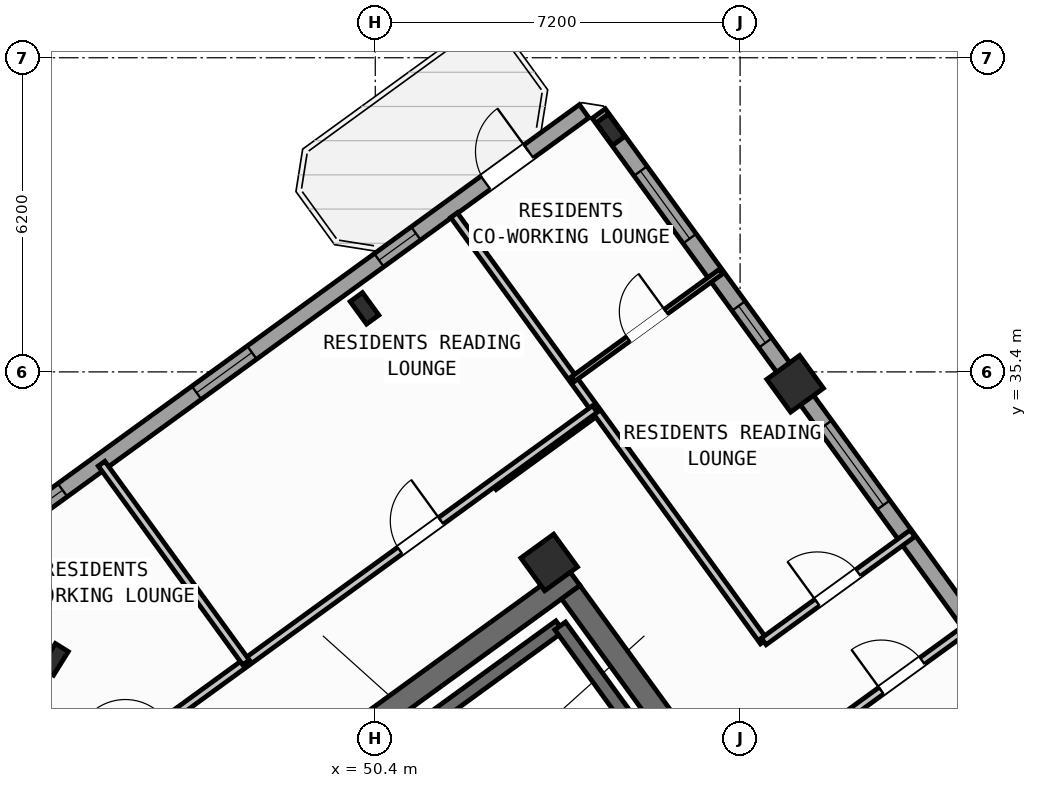
"""IFC4 building model, lengths in metres.
Left out: names, types, materials, properties, quantities, classifications, styles, units other than length and angle.
Written with IfcOpenShell. Run it as: python <this file> out.ifc"""

import sys

from ifc_helpers import new_model, si_unit, direction, frame, frame_2d, origin, origin_2d, place, context, subcontext, project, spatial, rectangle, hollow_rectangle, i_section, extrude, source, transform, mapped, element, fill, save


model = new_model("IFC4")
c1 = context("Model", 3, precision=1e-05, world=origin(), true_north=direction((0.0, 1.0)))
c2 = subcontext(c1, "Body", "Model", "MODEL_VIEW")
j1 = project(units=[si_unit("LENGTHUNIT", "METRE"), si_unit("PLANEANGLEUNIT", "RADIAN")], contexts=[c1])
p1 = place(None, origin())
s1 = spatial("IfcSite", under=j1, at=p1, CompositionType="ELEMENT")
p2 = place(p1, origin())
s2 = spatial("IfcBuilding", under=s1, at=p2, CompositionType="ELEMENT")
p3 = place(p2, frame((0.0, 0.0, 214.8)))
s3 = spatial("IfcBuildingStorey", under=s2, at=p3, CompositionType="ELEMENT", Elevation=214.8)
p4 = place(p3, frame((44.406, 24.172, 0.0), z_axis=(0.0, 0.0, 1.0), x_axis=(0.809012867805, 0.587790931986, 0.0)))
e1 = element("IfcWall", 1, at=p4, inside=s3, PredefinedType="SHEAR", context=c2, shape_type="SweptSolid", body=[
    extrude(rectangle(XDim=12.24, YDim=0.45, at=frame_2d((6.12, 0.0))), origin(), (0.0, 0.0, 1.0), 3.35),
])
p5 = place(p3, frame((58.064, 25.813, 0.0), z_axis=(0.0, 0.0, 1.0), x_axis=(-0.587774812919, 0.809024578921, 0.0)))
e2 = element("IfcWall", 2, at=p5, inside=s3, PredefinedType="SHEAR", context=c2, shape_type="SweptSolid", body=[
    extrude(rectangle(XDim=6.475, YDim=0.45, at=frame_2d((3.238, 0.0))), origin(), (0.0, 0.0, 1.0), 3.35),
])
m1 = source(origin(), c2, "Body", "SweptSolid", [
    extrude(i_section(OverallWidth=0.3, OverallDepth=0.55, WebThickness=0.015, FlangeThickness=0.029, at=origin_2d()), origin(), (0.0, 0.0, 1.0), 3.6),
])
p6 = place(p3, frame((44.068, 29.726, 0.0), z_axis=(0.0, 0.0, 1.0), x_axis=(-0.848048096156, 0.529919264233, 0.0)))
e3 = element("IfcColumn", 3, at=p6, inside=s3, PredefinedType="COLUMN", context=c2, shape_type="MappedRepresentation", body=[
    mapped(m1, transform((0.0, 0.0, 0.0), scale=1.0)),
])
m2 = source(origin(), c2, "Body", "SweptSolid", [
    extrude(hollow_rectangle(XDim=0.8, YDim=0.8, WallThickness=0.032, at=origin_2d()), origin(), (0.0, 0.0, 1.0), 3.6),
])
p7 = place(p3, frame((53.832, 31.638, 0.0), z_axis=(0.0, 0.0, 1.0), x_axis=(0.809016994375, 0.587785252292, 0.0)))
e4 = element("IfcColumn", 4, at=p7, inside=s3, PredefinedType="COLUMN", context=c2, shape_type="MappedRepresentation", body=[
    mapped(m2, transform((0.0, 0.0, 0.0), scale=1.0)),
])
p8 = place(p3, frame((50.188, 36.654, 0.0), z_axis=(0.0, 0.0, 1.0), x_axis=(0.809016994375, 0.587785252292, 0.0)))
e5 = element("IfcColumn", 5, at=p8, inside=s3, PredefinedType="COLUMN", context=c2, shape_type="MappedRepresentation", body=[
    mapped(m1, transform((0.0, 0.0, 0.0), scale=1.0)),
])
p9 = place(p3, frame((58.686, 35.165, 0.0), z_axis=(0.0, 0.0, 1.0), x_axis=(0.809016994375, 0.587785252292, 0.0)))
e6 = element("IfcColumn", 6, at=p9, inside=s3, PredefinedType="COLUMN", context=c2, shape_type="MappedRepresentation", body=[
    mapped(m2, transform((0.0, 0.0, 0.0), scale=1.0)),
])
p10 = place(p3, frame((55.042, 40.181, 0.0), z_axis=(0.0, 0.0, 1.0), x_axis=(0.809016994375, 0.587785252292, 0.0)))
e7 = element("IfcColumn", 7, at=p10, inside=s3, PredefinedType="COLUMN", context=c2, shape_type="MappedRepresentation", body=[
    mapped(m1, transform((0.0, 0.0, 0.0), scale=1.0)),
])
p11 = place(p3, frame((42.207, 31.597, 0.0), z_axis=(0.0, 0.0, 1.0), x_axis=(0.809020333377, 0.587780656523, 0.0)))
e8 = element("IfcWall", 8, at=p11, inside=s3, PredefinedType="STANDARD", context=c2, shape_type="SweptSolid", body=[
    extrude(rectangle(XDim=15.223, YDim=0.32, at=frame_2d((7.611, 0.0))), origin(), (0.0, 0.0, 1.0), 3.35),
])
p12 = place(p11, frame((12.82, 0.0, 0.0)))
e9 = element("IfcOpeningElement", 9, at=p12, cuts=e8, PredefinedType="OPENING", context=c2, shape_type="SweptSolid", body=[
    extrude(rectangle(XDim=1.05, YDim=2.15, at=frame_2d((0.525, 1.075))), frame((0.0, 0.17, 0.0), z_axis=(0.0, -1.0, 0.0), x_axis=(1.0, 0.0, 0.0)), (0.0, 0.0, 1.0), 0.34),
])
p13 = place(p11, frame((0.85, 0.0, 0.9)))
e10 = element("IfcOpeningElement", 10, at=p13, cuts=e8, PredefinedType="OPENING", context=c2, shape_type="SweptSolid", body=[
    extrude(rectangle(XDim=1.65, YDim=1.45, at=frame_2d((0.825, 0.725))), frame((0.0, 0.17, 0.0), z_axis=(0.0, -1.0, 0.0), x_axis=(1.0, 0.0, 0.0)), (0.0, 0.0, 1.0), 0.34),
])
p14 = place(p11, frame((5.769, 0.0, 0.9)))
e11 = element("IfcOpeningElement", 11, at=p14, cuts=e8, PredefinedType="OPENING", context=c2, shape_type="SweptSolid", body=[
    extrude(rectangle(XDim=1.35, YDim=1.45, at=frame_2d((0.675, 0.725))), frame((0.0, 0.17, 0.0), z_axis=(0.0, -1.0, 0.0), x_axis=(1.0, 0.0, 0.0)), (0.0, 0.0, 1.0), 0.34),
])
p15 = place(p11, frame((10.219, 0.0, 1.0)))
e12 = element("IfcOpeningElement", 12, at=p15, cuts=e8, PredefinedType="OPENING", context=c2, shape_type="SweptSolid", body=[
    extrude(rectangle(XDim=0.9, YDim=1.25, at=frame_2d((0.45, 0.625))), frame((0.0, 0.17, 0.0), z_axis=(0.0, -1.0, 0.0), x_axis=(1.0, 0.0, 0.0)), (0.0, 0.0, 1.0), 0.34),
])
p16 = place(p3, frame((54.81, 40.5, 0.0), z_axis=(0.0, 0.0, 1.0), x_axis=(0.587783625747, -0.809018176127, 0.0)))
e13 = element("IfcWall", 13, at=p16, inside=s3, PredefinedType="STANDARD", context=c2, shape_type="SweptSolid", body=[
    extrude(rectangle(XDim=21.587, YDim=0.32, at=frame_2d((10.794, 0.0))), origin(), (0.0, 0.0, 1.0), 2.825),
])
p17 = place(p16, frame((1.403, 0.0, 0.9)))
e14 = element("IfcOpeningElement", 14, at=p17, cuts=e13, PredefinedType="OPENING", context=c2, shape_type="SweptSolid", body=[
    extrude(rectangle(XDim=1.65, YDim=1.45, at=frame_2d((0.825, 0.725))), frame((0.0, 0.17, 0.0), z_axis=(0.0, -1.0, 0.0), x_axis=(1.0, 0.0, 0.0)), (0.0, 0.0, 1.0), 0.34),
])
p18 = place(p16, frame((4.695, 0.0, 1.0)))
e15 = element("IfcOpeningElement", 15, at=p18, cuts=e13, PredefinedType="OPENING", context=c2, shape_type="SweptSolid", body=[
    extrude(rectangle(XDim=0.9, YDim=1.25, at=frame_2d((0.45, 0.625))), frame((0.0, 0.17, 0.0), z_axis=(0.0, -1.0, 0.0), x_axis=(1.0, 0.0, 0.0)), (0.0, 0.0, 1.0), 0.34),
])
p19 = place(p16, frame((7.604, 0.0, 0.95)))
e16 = element("IfcOpeningElement", 16, at=p19, cuts=e13, PredefinedType="OPENING", context=c2, shape_type="SweptSolid", body=[
    extrude(rectangle(XDim=1.95, YDim=1.35, at=frame_2d((0.975, 0.675))), frame((0.0, 0.17, 0.0), z_axis=(0.0, -1.0, 0.0), x_axis=(1.0, 0.0, 0.0)), (0.0, 0.0, 1.0), 0.34),
])
p20 = place(p16, frame((15.692, 0.0, 1.0)))
e17 = element("IfcOpeningElement", 17, at=p20, cuts=e13, PredefinedType="OPENING", context=c2, shape_type="SweptSolid", body=[
    extrude(rectangle(XDim=0.9, YDim=1.25, at=frame_2d((0.45, 0.625))), frame((0.0, 0.17, 0.0), z_axis=(0.0, -1.0, 0.0), x_axis=(1.0, 0.0, 0.0)), (0.0, 0.0, 1.0), 0.34),
])
p21 = place(p16, frame((18.872, 0.0, 0.9)))
e18 = element("IfcOpeningElement", 18, at=p21, cuts=e13, PredefinedType="OPENING", context=c2, shape_type="SweptSolid", body=[
    extrude(rectangle(XDim=1.35, YDim=1.45, at=frame_2d((0.675, 0.725))), frame((0.0, 0.17, 0.0), z_axis=(0.0, -1.0, 0.0), x_axis=(1.0, 0.0, 0.0)), (0.0, 0.0, 1.0), 0.34),
])
p22 = place(p3, frame((48.006, 25.996, 0.0), z_axis=(0.0, 0.0, 1.0), x_axis=(0.80901903764, 0.587782439969, 0.0)))
e19 = element("IfcWall", 19, at=p22, inside=s3, PredefinedType="SHEAR", context=c2, shape_type="SweptSolid", body=[
    extrude(rectangle(XDim=7.46, YDim=0.26, at=frame_2d((3.73, 0.0))), origin(), (0.0, 0.0, 1.0), 3.35),
])
p23 = place(p3, frame((55.906, 27.831, 0.0), z_axis=(0.0, 0.0, 1.0), x_axis=(-0.587804123638, 0.809003283204, 0.0)))
e20 = element("IfcWall", 20, at=p23, inside=s3, PredefinedType="SHEAR", context=c2, shape_type="SweptSolid", body=[
    extrude(rectangle(XDim=3.16, YDim=0.26, at=frame_2d((1.58, 0.0))), origin(), (0.0, 0.0, 1.0), 3.35),
])
p24 = place(p3, frame((52.739, 33.143, 0.0), z_axis=(0.0, 0.0, 1.0), x_axis=(0.809000999347, 0.58780726693, 0.0)))
e21 = element("IfcWall", 21, at=p24, inside=s3, PredefinedType="PARTITIONING", context=c2, shape_type="SweptSolid", body=[
    extrude(rectangle(XDim=2.51, YDim=0.16, at=frame_2d((1.255, 0.0))), origin(), (0.0, 0.0, 1.0), 3.34),
])
p25 = place(p3, frame((58.067, 30.08, 0.0), z_axis=(0.0, 0.0, 1.0), x_axis=(-0.587787785243, 0.809015154073, 0.0)))
e22 = element("IfcWall", 22, at=p25, inside=s3, PredefinedType="PARTITIONING", context=c2, shape_type="SweptSolid", body=[
    extrude(rectangle(XDim=10.4, YDim=0.16, at=frame_2d((5.2, 0.0))), origin(), (0.0, 0.0, 1.0), 3.34),
])
p26 = place(p3, frame((59.331, 28.341, 0.0), z_axis=(0.0, 0.0, 1.0), x_axis=(0.809003564202, 0.587803736896, 0.0)))
e23 = element("IfcWall", 23, at=p26, inside=s3, PredefinedType="PARTITIONING", context=c2, shape_type="SweptSolid", body=[
    extrude(rectangle(XDim=3.63, YDim=0.16, at=frame_2d((1.815, 0.0))), origin(), (0.0, 0.0, 1.0), 3.34),
])
p27 = place(p26, frame((1.305, 0.0, 0.0)))
e24 = element("IfcOpeningElement", 24, at=p27, cuts=e23, PredefinedType="OPENING", context=c2, shape_type="SweptSolid", body=[
    extrude(rectangle(XDim=1.0, YDim=2.1, at=frame_2d((0.5, 1.05))), frame((0.0, 0.09, 0.0), z_axis=(0.0, -1.0, 0.0), x_axis=(1.0, 0.0, 0.0)), (0.0, 0.0, 1.0), 0.18),
])
p28 = place(p3, frame((58.067, 30.08, 0.0), z_axis=(0.0, 0.0, 1.0), x_axis=(0.809012309495, 0.587791700422, 0.0)))
e25 = element("IfcWall", 25, at=p28, inside=s3, PredefinedType="PARTITIONING", context=c2, shape_type="SweptSolid", body=[
    extrude(rectangle(XDim=3.63, YDim=0.16, at=frame_2d((1.815, 0.0))), origin(), (0.0, 0.0, 1.0), 3.34),
])
p29 = place(p28, frame((1.305, 0.0, 0.0)))
e26 = element("IfcOpeningElement", 26, at=p29, cuts=e25, PredefinedType="OPENING", context=c2, shape_type="SweptSolid", body=[
    extrude(rectangle(XDim=1.0, YDim=2.1, at=frame_2d((0.5, 1.05))), frame((0.0, 0.09, 0.0), z_axis=(0.0, -1.0, 0.0), x_axis=(1.0, 0.0, 0.0)), (0.0, 0.0, 1.0), 0.18),
])
p30 = place(p3, frame((54.304, 35.259, 0.0), z_axis=(0.0, 0.0, 1.0), x_axis=(0.809005039917, 0.58780170584, 0.0)))
e27 = element("IfcWall", 27, at=p30, inside=s3, PredefinedType="PARTITIONING", context=c2, shape_type="SweptSolid", body=[
    extrude(rectangle(XDim=3.61, YDim=0.11, at=frame_2d((1.805, 0.0))), origin(), (0.0, 0.0, 1.0), 3.34),
])
p31 = place(p30, frame((1.345, 0.0, 0.0)))
e28 = element("IfcOpeningElement", 28, at=p31, cuts=e27, PredefinedType="OPENING", context=c2, shape_type="SweptSolid", body=[
    extrude(rectangle(XDim=0.92, YDim=2.08, at=frame_2d((0.46, 1.04))), frame((0.0, 0.065, 0.0), z_axis=(0.0, -1.0, 0.0), x_axis=(1.0, 0.0, 0.0)), (0.0, 0.0, 1.0), 0.13),
])
p32 = place(p3, frame((42.866, 26.044, 0.0), z_axis=(0.0, 0.0, 1.0), x_axis=(0.809020254154, 0.587780765566, 0.0)))
e29 = element("IfcWall", 29, at=p32, inside=s3, PredefinedType="PARTITIONING", context=c2, shape_type="SweptSolid", body=[
    extrude(rectangle(XDim=14.67, YDim=0.16, at=frame_2d((7.335, 0.0))), origin(), (0.0, 0.0, 1.0), 3.34),
])
p33 = place(p32, frame((3.215, 0.0, 0.0)))
e30 = element("IfcOpeningElement", 30, at=p33, cuts=e29, PredefinedType="OPENING", context=c2, shape_type="SweptSolid", body=[
    extrude(rectangle(XDim=1.0, YDim=2.1, at=frame_2d((0.5, 1.05))), frame((0.0, 0.09, 0.0), z_axis=(0.0, -1.0, 0.0), x_axis=(1.0, 0.0, 0.0)), (0.0, 0.0, 1.0), 0.18),
])
p34 = place(p32, frame((9.915, 0.0, 0.0)))
e31 = element("IfcOpeningElement", 31, at=p34, cuts=e29, PredefinedType="OPENING", context=c2, shape_type="SweptSolid", body=[
    extrude(rectangle(XDim=1.0, YDim=2.1, at=frame_2d((0.5, 1.05))), frame((0.0, 0.09, 0.0), z_axis=(0.0, -1.0, 0.0), x_axis=(1.0, 0.0, 0.0)), (0.0, 0.0, 1.0), 0.18),
])
p35 = place(p3, frame((43.969, 26.55, 0.0), z_axis=(0.0, 0.0, 1.0), x_axis=(-0.587776919386, 0.80902304852, 0.0)))
e32 = element("IfcWall", 32, at=p35, inside=s3, PredefinedType="PARTITIONING", context=c2, shape_type="SweptSolid", body=[
    extrude(rectangle(XDim=5.48, YDim=0.16, at=frame_2d((2.74, 0.0))), origin(), (0.0, 0.0, 1.0), 3.34),
])
p36 = place(p3, frame((47.849, 29.665, 0.0), z_axis=(0.0, 0.0, 1.0), x_axis=(-0.587785532001, 0.809016791155, 0.0)))
e33 = element("IfcWall", 33, at=p36, inside=s3, PredefinedType="PARTITIONING", context=c2, shape_type="SweptSolid", body=[
    extrude(rectangle(XDim=4.85, YDim=0.16, at=frame_2d((2.425, 0.0))), origin(), (0.0, 0.0, 1.0), 3.34),
])
m3 = source(origin(), c2, "Body", "SweptSolid", [
    extrude(rectangle(XDim=1.05, YDim=2.15, at=frame_2d((0.525, 1.075))), frame((0.0, 0.025, 0.0), z_axis=(0.0, -1.0, 0.0), x_axis=(1.0, 0.0, 0.0)), (0.0, 0.0, 1.0), 0.05),
])
p37 = place(p12, origin())
e34 = element("IfcDoor", 34, at=p37, inside=s3, OperationType="SINGLE_SWING_RIGHT", PredefinedType="DOOR", context=c2, shape_type="MappedRepresentation", body=[
    mapped(m3, transform((0.0, 0.0, 0.0), scale=1.0)),
])
fill(e9, e34)
m4 = source(origin(), c2, "Body", "SweptSolid", [
    extrude(rectangle(XDim=1.65, YDim=1.45, at=frame_2d((0.825, 0.725))), frame((0.0, 0.03, 0.0), z_axis=(0.0, -1.0, 0.0), x_axis=(1.0, 0.0, 0.0)), (0.0, 0.0, 1.0), 0.06),
])
p38 = place(p13, origin())
e35 = element("IfcWindow", 35, at=p38, inside=s3, PartitioningType="SINGLE_PANEL", PredefinedType="WINDOW", context=c2, shape_type="MappedRepresentation", body=[
    mapped(m4, transform((0.0, 0.0, 0.0), scale=1.0)),
])
fill(e10, e35)
m5 = source(origin(), c2, "Body", "SweptSolid", [
    extrude(rectangle(XDim=1.35, YDim=1.45, at=frame_2d((0.675, 0.725))), frame((0.0, 0.03, 0.0), z_axis=(0.0, -1.0, 0.0), x_axis=(1.0, 0.0, 0.0)), (0.0, 0.0, 1.0), 0.06),
])
p39 = place(p14, origin())
e36 = element("IfcWindow", 36, at=p39, inside=s3, PartitioningType="SINGLE_PANEL", PredefinedType="WINDOW", context=c2, shape_type="MappedRepresentation", body=[
    mapped(m5, transform((0.0, 0.0, 0.0), scale=1.0)),
])
fill(e11, e36)
m6 = source(origin(), c2, "Body", "SweptSolid", [
    extrude(rectangle(XDim=0.9, YDim=1.25, at=frame_2d((0.45, 0.625))), frame((0.0, 0.03, 0.0), z_axis=(0.0, -1.0, 0.0), x_axis=(1.0, 0.0, 0.0)), (0.0, 0.0, 1.0), 0.06),
])
p40 = place(p15, origin())
e37 = element("IfcWindow", 37, at=p40, inside=s3, PartitioningType="SINGLE_PANEL", PredefinedType="WINDOW", context=c2, shape_type="MappedRepresentation", body=[
    mapped(m6, transform((0.0, 0.0, 0.0), scale=1.0)),
])
fill(e12, e37)
p41 = place(p17, origin())
e38 = element("IfcWindow", 38, at=p41, inside=s3, PartitioningType="SINGLE_PANEL", PredefinedType="WINDOW", context=c2, shape_type="MappedRepresentation", body=[
    mapped(m4, transform((0.0, 0.0, 0.0), scale=1.0)),
])
fill(e14, e38)
p42 = place(p18, origin())
e39 = element("IfcWindow", 39, at=p42, inside=s3, PartitioningType="SINGLE_PANEL", PredefinedType="WINDOW", context=c2, shape_type="MappedRepresentation", body=[
    mapped(m6, transform((0.0, 0.0, 0.0), scale=1.0)),
])
fill(e15, e39)
m7 = source(origin(), c2, "Body", "SweptSolid", [
    extrude(rectangle(XDim=1.95, YDim=1.35, at=frame_2d((0.975, 0.675))), frame((0.0, 0.03, 0.0), z_axis=(0.0, -1.0, 0.0), x_axis=(1.0, 0.0, 0.0)), (0.0, 0.0, 1.0), 0.06),
])
p43 = place(p19, origin())
e40 = element("IfcWindow", 40, at=p43, inside=s3, PartitioningType="SINGLE_PANEL", PredefinedType="WINDOW", context=c2, shape_type="MappedRepresentation", body=[
    mapped(m7, transform((0.0, 0.0, 0.0), scale=1.0)),
])
fill(e16, e40)
m8 = source(origin(), c2, "Body", "SweptSolid", [
    extrude(rectangle(XDim=1.0, YDim=2.1, at=frame_2d((0.5, 1.05))), frame((0.0, 0.025, 0.0), z_axis=(0.0, -1.0, 0.0), x_axis=(1.0, 0.0, 0.0)), (0.0, 0.0, 1.0), 0.05),
])
p44 = place(p29, origin())
e41 = element("IfcDoor", 41, at=p44, inside=s3, OperationType="SINGLE_SWING_LEFT", PredefinedType="DOOR", context=c2, shape_type="MappedRepresentation", body=[
    mapped(m8, transform((0.0, 0.0, 0.0), scale=1.0)),
])
fill(e26, e41)
m9 = source(origin(), c2, "Body", "SweptSolid", [
    extrude(rectangle(XDim=0.92, YDim=2.08, at=frame_2d((0.46, 1.04))), frame((0.0, 0.025, 0.0), z_axis=(0.0, -1.0, 0.0), x_axis=(1.0, 0.0, 0.0)), (0.0, 0.0, 1.0), 0.05),
])
p45 = place(p31, origin())
e42 = element("IfcDoor", 42, at=p45, inside=s3, OperationType="SINGLE_SWING_RIGHT", PredefinedType="DOOR", context=c2, shape_type="MappedRepresentation", body=[
    mapped(m9, transform((0.0, 0.0, 0.0), scale=1.0)),
])
fill(e28, e42)
p46 = place(p27, origin())
e43 = element("IfcDoor", 43, at=p46, inside=s3, OperationType="SINGLE_SWING_LEFT", PredefinedType="DOOR", context=c2, shape_type="MappedRepresentation", body=[
    mapped(m8, transform((0.0, 0.0, 0.0), scale=1.0)),
])
fill(e24, e43)
p47 = place(p34, origin())
e44 = element("IfcDoor", 44, at=p47, inside=s3, OperationType="SINGLE_SWING_RIGHT", PredefinedType="DOOR", context=c2, shape_type="MappedRepresentation", body=[
    mapped(m8, transform((0.0, 0.0, 0.0), scale=1.0)),
])
fill(e31, e44)
save(model, sys.argv[1])
